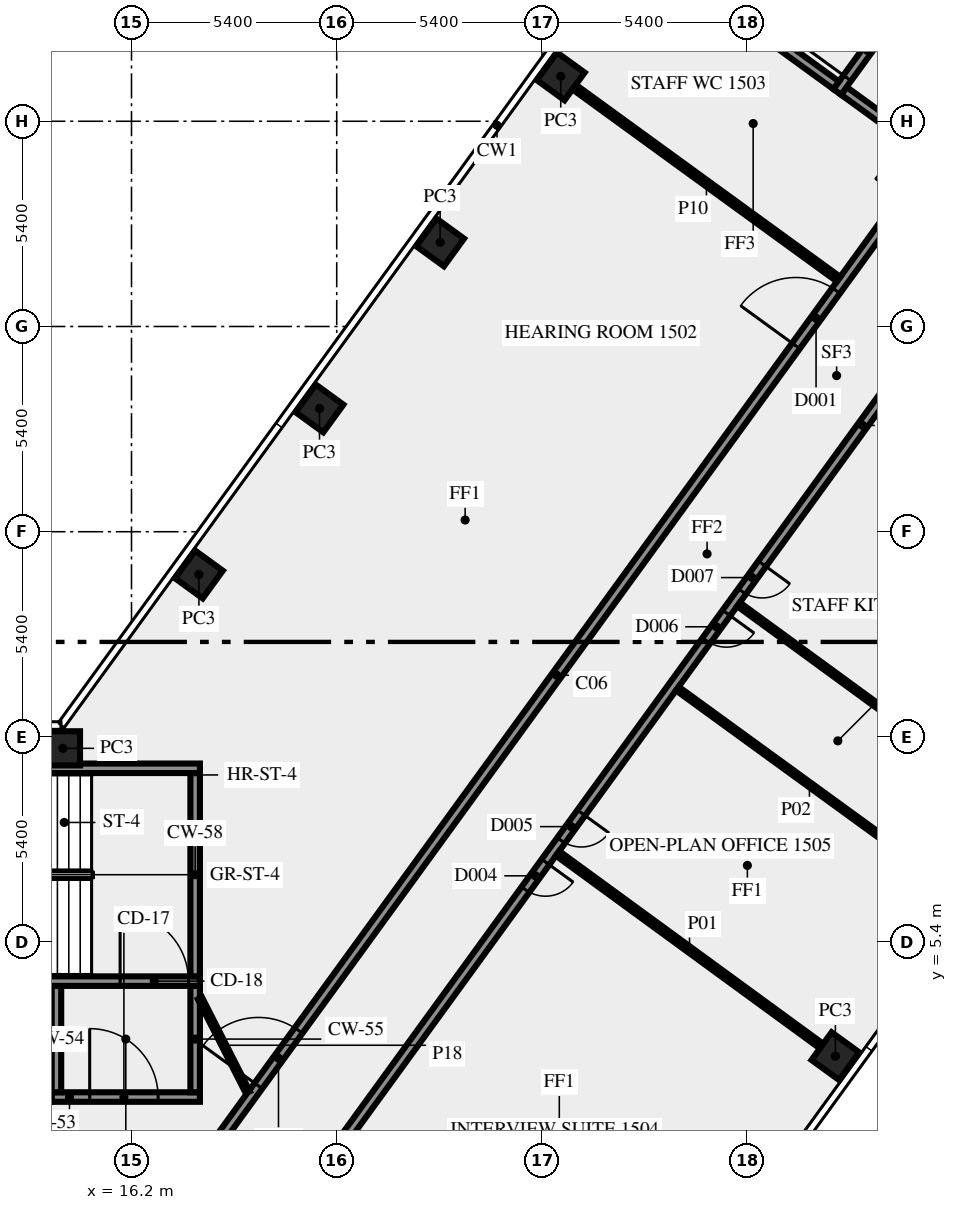
"""IFC4 building model, lengths in metres.
Left out: names, types, materials, properties, quantities, classifications, styles, units other than length and angle.
Written with IfcOpenShell. Run it as: python <this file> out.ifc"""

import sys

from ifc_helpers import new_model, si_unit, direction, frame, frame_2d, origin, origin_2d, place, context, subcontext, project, spatial, rectangle, extrude, element, fill, save


model = new_model("IFC4")
c1 = context("Model", 3, precision=1e-05, world=origin(), true_north=direction((0.0, 1.0)))
c2 = subcontext(c1, "Body", "Model", "MODEL_VIEW")
j1 = project(units=[si_unit("LENGTHUNIT", "METRE"), si_unit("PLANEANGLEUNIT", "RADIAN")], contexts=[c1])
p1 = place(None, origin())
s1 = spatial("IfcSite", under=j1, at=p1, CompositionType="ELEMENT")
p2 = place(p1, origin())
s2 = spatial("IfcBuilding", under=s1, at=p2, CompositionType="ELEMENT")
p3 = place(p2, frame((0.0, 0.0, 67.0)))
s3 = spatial("IfcBuildingStorey", under=s2, at=p3, CompositionType="ELEMENT", Elevation=67.0)
for number, where, z_axis, x_axis in (
    (1, (34.722, 2.4, 0.0), (0.0, 0.0, 1.0), (0.588, 0.809, 0.0)),
    (2, (27.495, 28.181, 0.0), (0.0, 0.0, 1.0), (-0.588, -0.809, 0.0)),
    (3, (24.321, 23.812, 0.0), (0.0, 0.0, 1.0), (-0.588, -0.809, 0.0)),
    (4, (21.147, 19.444, 0.0), (0.0, 0.0, 1.0), (-0.588, -0.809, 0.0)),
    (5, (17.974, 15.075, 0.0), (0.0, 0.0, 1.0), (-0.588, -0.809, 0.0)),
    (6, (14.395, 10.5, 0.0), (0.0, 0.0, 1.0), (-1.0, 0.0, 0.0)),
):
    element("IfcColumn", number, at=place(p3, frame(where, z_axis=z_axis, x_axis=x_axis)), inside=s3, PredefinedType="COLUMN", context=c2, shape_type="SweptSolid", body=[
        extrude(rectangle(XDim=0.9, YDim=0.9, at=origin_2d()), origin(), (0.0, 0.0, 1.0), 3.65),
    ])
p4 = place(p3, frame((14.1, 1.325, 0.0), z_axis=(0.0, 0.0, 1.0), x_axis=(1.0, 0.0, 0.0)))
e7 = element("IfcWall", 7, at=p4, inside=s3, PredefinedType="SHEAR", context=c2, shape_type="SweptSolid", body=[
    extrude(rectangle(XDim=3.9, YDim=0.25, at=frame_2d((1.95, 0.0))), origin(), (0.0, 0.0, 1.0), 3.65),
])
p5 = place(p4, frame((1.0, 0.0, 0.0)))
e8 = element("IfcOpeningElement", 8, at=p5, cuts=e7, PredefinedType="OPENING", context=c2, shape_type="SweptSolid", body=[
    extrude(rectangle(XDim=1.8, YDim=2.1, at=frame_2d((0.9, 1.05))), frame((0.0, 0.135, 0.0), z_axis=(0.0, -1.0, 0.0), x_axis=(1.0, 0.0, 0.0)), (0.0, 0.0, 1.0), 0.27),
])
for number, where, z_axis, x_axis in (
    (9, (14.225, 1.45, 0.0), (0.0, 0.0, 1.0), (0.0, 1.0, 0.0)),
    (10, (17.875, 1.45, 0.0), (0.0, 0.0, 1.0), (0.0, 1.0, 0.0)),
):
    element("IfcWall", number, at=place(p3, frame(where, z_axis=z_axis, x_axis=x_axis)), inside=s3, PredefinedType="SHEAR", context=c2, shape_type="SweptSolid", body=[
        extrude(rectangle(XDim=2.8, YDim=0.25, at=frame_2d((1.4, 0.0))), origin(), (0.0, 0.0, 1.0), 3.65),
    ])
p6 = place(p3, frame((7.5, 4.375, 0.0), z_axis=(0.0, 0.0, 1.0), x_axis=(1.0, 0.0, 0.0)))
e11 = element("IfcWall", 11, at=p6, inside=s3, PredefinedType="SHEAR", context=c2, shape_type="SweptSolid", body=[
    extrude(rectangle(XDim=10.5, YDim=0.25, at=frame_2d((5.25, 0.0))), origin(), (0.0, 0.0, 1.0), 3.65),
])
p7 = place(p6, frame((8.4, 0.0, 0.0)))
e12 = element("IfcOpeningElement", 12, at=p7, cuts=e11, PredefinedType="OPENING", context=c2, shape_type="SweptSolid", body=[
    extrude(rectangle(XDim=1.8, YDim=2.1, at=frame_2d((0.9, 1.05))), frame((0.0, 0.135, 0.0), z_axis=(0.0, -1.0, 0.0), x_axis=(1.0, 0.0, 0.0)), (0.0, 0.0, 1.0), 0.27),
])
p8 = place(p3, frame((17.875, 4.5, 0.0), z_axis=(0.0, 0.0, 1.0), x_axis=(0.0, 1.0, 0.0)))
e13 = element("IfcWall", 13, at=p8, inside=s3, PredefinedType="SHEAR", context=c2, shape_type="SweptSolid", body=[
    extrude(rectangle(XDim=5.35, YDim=0.25, at=frame_2d((2.675, 0.0))), origin(), (0.0, 0.0, 1.0), 3.65),
])
p9 = place(p3, frame((7.5, 9.975, 0.0), z_axis=(0.0, 0.0, 1.0), x_axis=(1.0, 0.0, 0.0)))
e14 = element("IfcWall", 14, at=p9, inside=s3, PredefinedType="SHEAR", context=c2, shape_type="SweptSolid", body=[
    extrude(rectangle(XDim=10.5, YDim=0.25, at=frame_2d((5.25, 0.0))), origin(), (0.0, 0.0, 1.0), 3.65),
])
p10 = place(p9, frame((2.0, 0.0, 1.0)))
e15 = element("IfcOpeningElement", 15, at=p10, cuts=e14, PredefinedType="OPENING", context=c2, shape_type="SweptSolid", body=[
    extrude(rectangle(XDim=1.2, YDim=1.2, at=frame_2d((0.6, 0.6))), frame((0.0, 0.135, 0.0), z_axis=(0.0, -1.0, 0.0), x_axis=(1.0, 0.0, 0.0)), (0.0, 0.0, 1.0), 0.27),
])
p11 = place(p3, frame((37.21, 26.154, 0.0), z_axis=(0.0, 0.0, 1.0), x_axis=(-0.809041377956, 0.587751689708, 0.0)))
e16 = element("IfcWall", 16, at=p11, inside=s3, PredefinedType="SHEAR", context=c2, shape_type="SweptSolid", body=[
    extrude(rectangle(XDim=2.8, YDim=0.25, at=frame_2d((1.4, 0.0))), origin(), (0.0, 0.0, 1.0), 3.65),
])
p12 = place(p3, frame((34.77, 27.772, 0.0), z_axis=(0.0, 0.0, 1.0), x_axis=(0.587795589702, 0.809009483706, 0.0)))
e17 = element("IfcWall", 17, at=p12, inside=s3, PredefinedType="SHEAR", context=c2, shape_type="SweptSolid", body=[
    extrude(rectangle(XDim=10.5, YDim=0.25, at=frame_2d((5.25, 0.0))), origin(), (0.0, 0.0, 1.0), 3.65),
])
p13 = place(p12, frame((0.45, 0.0, 0.0)))
e18 = element("IfcOpeningElement", 18, at=p13, cuts=e17, PredefinedType="OPENING", context=c2, shape_type="SweptSolid", body=[
    extrude(rectangle(XDim=1.8, YDim=2.1, at=frame_2d((0.9, 1.05))), frame((0.0, 0.135, 0.0), z_axis=(0.0, -1.0, 0.0), x_axis=(1.0, 0.0, 0.0)), (0.0, 0.0, 1.0), 0.27),
])
p14 = place(p3, frame((34.742, 27.947, 0.0), z_axis=(0.0, 0.0, 1.0), x_axis=(-0.8089984606, 0.587810760999, 0.0)))
e19 = element("IfcWall", 19, at=p14, inside=s3, PredefinedType="SHEAR", context=c2, shape_type="SweptSolid", body=[
    extrude(rectangle(XDim=5.35, YDim=0.25, at=frame_2d((2.675, 0.0))), origin(), (0.0, 0.0, 1.0), 3.65),
])
p15 = place(p3, frame((17.545, -1.125, 0.0), z_axis=(0.0, 0.0, 1.0), x_axis=(0.587786323093, 0.809016216391, 0.0)))
e20 = element("IfcWall", 20, at=p15, inside=s3, PredefinedType="SOLIDWALL", context=c2, shape_type="SweptSolid", body=[
    extrude(rectangle(XDim=33.493, YDim=0.25, at=frame_2d((16.747, 0.0))), origin(), (0.0, 0.0, 1.0), 3.65),
])
p16 = place(p15, frame((27.458, 0.0, 0.0)))
e21 = element("IfcOpeningElement", 21, at=p16, cuts=e20, PredefinedType="OPENING", context=c2, shape_type="SweptSolid", body=[
    extrude(rectangle(XDim=1.8, YDim=2.1, at=frame_2d((0.9, 1.05))), frame((0.0, 0.135, 0.0), z_axis=(0.0, -1.0, 0.0), x_axis=(1.0, 0.0, 0.0)), (0.0, 0.0, 1.0), 0.27),
])
p17 = place(p15, frame((3.392, 0.0, 0.0)))
e22 = element("IfcOpeningElement", 22, at=p17, cuts=e20, PredefinedType="OPENING", context=c2, shape_type="SweptSolid", body=[
    extrude(rectangle(XDim=1.8, YDim=2.1, at=frame_2d((0.9, 1.05))), frame((0.0, 0.135, 0.0), z_axis=(0.0, -1.0, 0.0), x_axis=(1.0, 0.0, 0.0)), (0.0, 0.0, 1.0), 0.27),
])
p18 = place(p15, frame((32.253, 0.0, 0.0)))
e23 = element("IfcOpeningElement", 23, at=p18, cuts=e20, PredefinedType="OPENING", context=c2, shape_type="SweptSolid", body=[
    extrude(rectangle(XDim=0.9, YDim=2.1, at=frame_2d((0.45, 1.05))), frame((0.0, 0.135, 0.0), z_axis=(0.0, -1.0, 0.0), x_axis=(1.0, 0.0, 0.0)), (0.0, 0.0, 1.0), 0.27),
])
p19 = place(p3, frame((43.467, 30.045, 0.0), z_axis=(0.0, 0.0, 1.0), x_axis=(-0.587784726077, -0.809017376692, 0.0)))
e24 = element("IfcWall", 24, at=p19, inside=s3, PredefinedType="SOLIDWALL", context=c2, shape_type="SweptSolid", body=[
    extrude(rectangle(XDim=39.02, YDim=0.25, at=frame_2d((19.51, 0.0))), origin(), (0.0, 0.0, 1.0), 3.65),
])
p20 = place(p19, frame((26.254, 0.0, 0.0)))
e25 = element("IfcOpeningElement", 25, at=p20, cuts=e24, PredefinedType="OPENING", context=c2, shape_type="SweptSolid", body=[
    extrude(rectangle(XDim=0.9, YDim=2.1, at=frame_2d((0.45, 1.05))), frame((0.0, 0.135, 0.0), z_axis=(0.0, -1.0, 0.0), x_axis=(1.0, 0.0, 0.0)), (0.0, 0.0, 1.0), 0.27),
])
p21 = place(p19, frame((2.205, 0.0, 0.0)))
e26 = element("IfcOpeningElement", 26, at=p21, cuts=e24, PredefinedType="OPENING", context=c2, shape_type="SweptSolid", body=[
    extrude(rectangle(XDim=0.9, YDim=2.1, at=frame_2d((0.45, 1.05))), frame((0.0, 0.135, 0.0), z_axis=(0.0, -1.0, 0.0), x_axis=(1.0, 0.0, 0.0)), (0.0, 0.0, 1.0), 0.27),
])
p22 = place(p19, frame((27.855, 0.0, 0.0)))
e27 = element("IfcOpeningElement", 27, at=p22, cuts=e24, PredefinedType="OPENING", context=c2, shape_type="SweptSolid", body=[
    extrude(rectangle(XDim=0.9, YDim=2.1, at=frame_2d((0.45, 1.05))), frame((0.0, 0.135, 0.0), z_axis=(0.0, -1.0, 0.0), x_axis=(1.0, 0.0, 0.0)), (0.0, 0.0, 1.0), 0.27),
])
p23 = place(p19, frame((18.155, 0.0, 0.0)))
e28 = element("IfcOpeningElement", 28, at=p23, cuts=e24, PredefinedType="OPENING", context=c2, shape_type="SweptSolid", body=[
    extrude(rectangle(XDim=0.9, YDim=2.1, at=frame_2d((0.45, 1.05))), frame((0.0, 0.135, 0.0), z_axis=(0.0, -1.0, 0.0), x_axis=(1.0, 0.0, 0.0)), (0.0, 0.0, 1.0), 0.27),
])
p24 = place(p19, frame((19.755, 0.0, 0.0)))
e29 = element("IfcOpeningElement", 29, at=p24, cuts=e24, PredefinedType="OPENING", context=c2, shape_type="SweptSolid", body=[
    extrude(rectangle(XDim=0.9, YDim=2.1, at=frame_2d((0.45, 1.05))), frame((0.0, 0.135, 0.0), z_axis=(0.0, -1.0, 0.0), x_axis=(1.0, 0.0, 0.0)), (0.0, 0.0, 1.0), 0.27),
])
p25 = place(p19, frame((0.224, 0.0, 0.0)))
e30 = element("IfcOpeningElement", 30, at=p25, cuts=e24, PredefinedType="OPENING", context=c2, shape_type="SweptSolid", body=[
    extrude(rectangle(XDim=0.9, YDim=2.1, at=frame_2d((0.45, 1.05))), frame((0.0, 0.135, 0.0), z_axis=(0.0, -1.0, 0.0), x_axis=(1.0, 0.0, 0.0)), (0.0, 0.0, 1.0), 0.27),
])
p26 = place(p3, frame((27.413, 7.735, 0.0), z_axis=(0.0, 0.0, 1.0), x_axis=(0.807664804385, -0.589641894507, 0.0)))
e31 = element("IfcWall", 31, at=p26, inside=s3, PredefinedType="PARTITIONING", context=c2, shape_type="SweptSolid", body=[
    extrude(rectangle(XDim=8.594, YDim=0.15, at=frame_2d((4.297, 0.0))), origin(), (0.0, 0.0, 1.0), 3.65),
])
p27 = place(p3, frame((37.516, 7.02, 0.0), z_axis=(0.0, 0.0, 1.0), x_axis=(-0.809002556908, 0.587805123248, 0.0)))
e32 = element("IfcWall", 32, at=p27, inside=s3, PredefinedType="PARTITIONING", context=c2, shape_type="SweptSolid", body=[
    extrude(rectangle(XDim=8.595, YDim=0.12, at=frame_2d((4.297, 0.0))), origin(), (0.0, 0.0, 1.0), 3.65),
])
p28 = place(p3, frame((34.806, 22.845, 0.0), z_axis=(0.0, 0.0, 1.0), x_axis=(-0.809030728677, 0.587766348183, 0.0)))
e33 = element("IfcWall", 33, at=p28, inside=s3, PredefinedType="PARTITIONING", context=c2, shape_type="SweptSolid", body=[
    extrude(rectangle(XDim=8.596, YDim=0.15, at=frame_2d((4.298, 0.0))), origin(), (0.0, 0.0, 1.0), 3.65),
])
p29 = place(p3, frame((32.174, 14.288, 0.0), z_axis=(0.0, 0.0, 1.0), x_axis=(0.807664588563, -0.589642190131, 0.0)))
e34 = element("IfcWall", 34, at=p29, inside=s3, PredefinedType="PARTITIONING", context=c2, shape_type="SweptSolid", body=[
    extrude(rectangle(XDim=9.55, YDim=0.12, at=frame_2d((4.775, 0.0))), origin(), (0.0, 0.0, 1.0), 2.75),
])
p30 = place(p3, frame((18.0, 3.925, 0.0), z_axis=(0.0, 0.0, 1.0), x_axis=(0.453950796792, -0.891026752736, 0.0)))
e35 = element("IfcWall", 35, at=p30, inside=s3, PredefinedType="PARTITIONING", context=c2, shape_type="SweptSolid", body=[
    extrude(rectangle(XDim=2.778, YDim=0.12, at=frame_2d((1.389, 0.0))), origin(), (0.0, 0.0, 1.0), 3.65),
])
p31 = place(p5, origin())
e36 = element("IfcDoor", 36, at=p31, inside=s3, OperationType="DOUBLE_DOOR_SINGLE_SWING", PredefinedType="DOOR", context=c2, shape_type="SweptSolid", body=[
    extrude(rectangle(XDim=1.8, YDim=2.1, at=frame_2d((0.9, 1.05))), frame((0.0, 0.025, 0.0), z_axis=(0.0, -1.0, 0.0), x_axis=(1.0, 0.0, 0.0)), (0.0, 0.0, 1.0), 0.05),
])
fill(e8, e36)
p32 = place(p7, origin())
e37 = element("IfcDoor", 37, at=p32, inside=s3, OperationType="DOUBLE_DOOR_SINGLE_SWING", PredefinedType="DOOR", context=c2, shape_type="SweptSolid", body=[
    extrude(rectangle(XDim=1.8, YDim=2.1, at=frame_2d((0.9, 1.05))), frame((0.0, 0.025, 0.0), z_axis=(0.0, -1.0, 0.0), x_axis=(1.0, 0.0, 0.0)), (0.0, 0.0, 1.0), 0.05),
])
fill(e12, e37)
p33 = place(p13, origin())
e38 = element("IfcDoor", 38, at=p33, inside=s3, OperationType="DOUBLE_DOOR_SINGLE_SWING", PredefinedType="DOOR", context=c2, shape_type="SweptSolid", body=[
    extrude(rectangle(XDim=1.8, YDim=2.1, at=frame_2d((0.9, 1.05))), frame((0.0, 0.025, 0.0), z_axis=(0.0, -1.0, 0.0), x_axis=(1.0, 0.0, 0.0)), (0.0, 0.0, 1.0), 0.05),
])
fill(e18, e38)
p34 = place(p20, origin())
e39 = element("IfcDoor", 39, at=p34, inside=s3, OperationType="SINGLE_SWING_RIGHT", PredefinedType="DOOR", context=c2, shape_type="SweptSolid", body=[
    extrude(rectangle(XDim=0.9, YDim=2.1, at=frame_2d((0.45, 1.05))), frame((0.0, 0.025, 0.0), z_axis=(0.0, -1.0, 0.0), x_axis=(1.0, 0.0, 0.0)), (0.0, 0.0, 1.0), 0.05),
])
fill(e25, e39)
p35 = place(p16, origin())
e40 = element("IfcDoor", 40, at=p35, inside=s3, OperationType="DOUBLE_DOOR_SINGLE_SWING", PredefinedType="DOOR", context=c2, shape_type="SweptSolid", body=[
    extrude(rectangle(XDim=1.8, YDim=2.1, at=frame_2d((0.9, 1.05))), frame((0.0, 0.025, 0.0), z_axis=(0.0, -1.0, 0.0), x_axis=(1.0, 0.0, 0.0)), (0.0, 0.0, 1.0), 0.05),
])
fill(e21, e40)
p36 = place(p17, origin())
e41 = element("IfcDoor", 41, at=p36, inside=s3, OperationType="DOUBLE_DOOR_SINGLE_SWING", PredefinedType="DOOR", context=c2, shape_type="SweptSolid", body=[
    extrude(rectangle(XDim=1.8, YDim=2.1, at=frame_2d((0.9, 1.05))), frame((0.0, 0.025, 0.0), z_axis=(0.0, -1.0, 0.0), x_axis=(1.0, 0.0, 0.0)), (0.0, 0.0, 1.0), 0.05),
])
fill(e22, e41)
p37 = place(p22, origin())
e42 = element("IfcDoor", 42, at=p37, inside=s3, OperationType="SINGLE_SWING_LEFT", PredefinedType="DOOR", context=c2, shape_type="SweptSolid", body=[
    extrude(rectangle(XDim=0.9, YDim=2.1, at=frame_2d((0.45, 1.05))), frame((0.0, 0.025, 0.0), z_axis=(0.0, -1.0, 0.0), x_axis=(1.0, 0.0, 0.0)), (0.0, 0.0, 1.0), 0.05),
])
fill(e27, e42)
p38 = place(p23, origin())
e43 = element("IfcDoor", 43, at=p38, inside=s3, OperationType="SINGLE_SWING_RIGHT", PredefinedType="DOOR", context=c2, shape_type="SweptSolid", body=[
    extrude(rectangle(XDim=0.9, YDim=2.1, at=frame_2d((0.45, 1.05))), frame((0.0, 0.025, 0.0), z_axis=(0.0, -1.0, 0.0), x_axis=(1.0, 0.0, 0.0)), (0.0, 0.0, 1.0), 0.05),
])
fill(e28, e43)
p39 = place(p24, origin())
e44 = element("IfcDoor", 44, at=p39, inside=s3, OperationType="SINGLE_SWING_LEFT", PredefinedType="DOOR", context=c2, shape_type="SweptSolid", body=[
    extrude(rectangle(XDim=0.9, YDim=2.1, at=frame_2d((0.45, 1.05))), frame((0.0, 0.025, 0.0), z_axis=(0.0, -1.0, 0.0), x_axis=(1.0, 0.0, 0.0)), (0.0, 0.0, 1.0), 0.05),
])
fill(e29, e44)
save(model, sys.argv[1])
